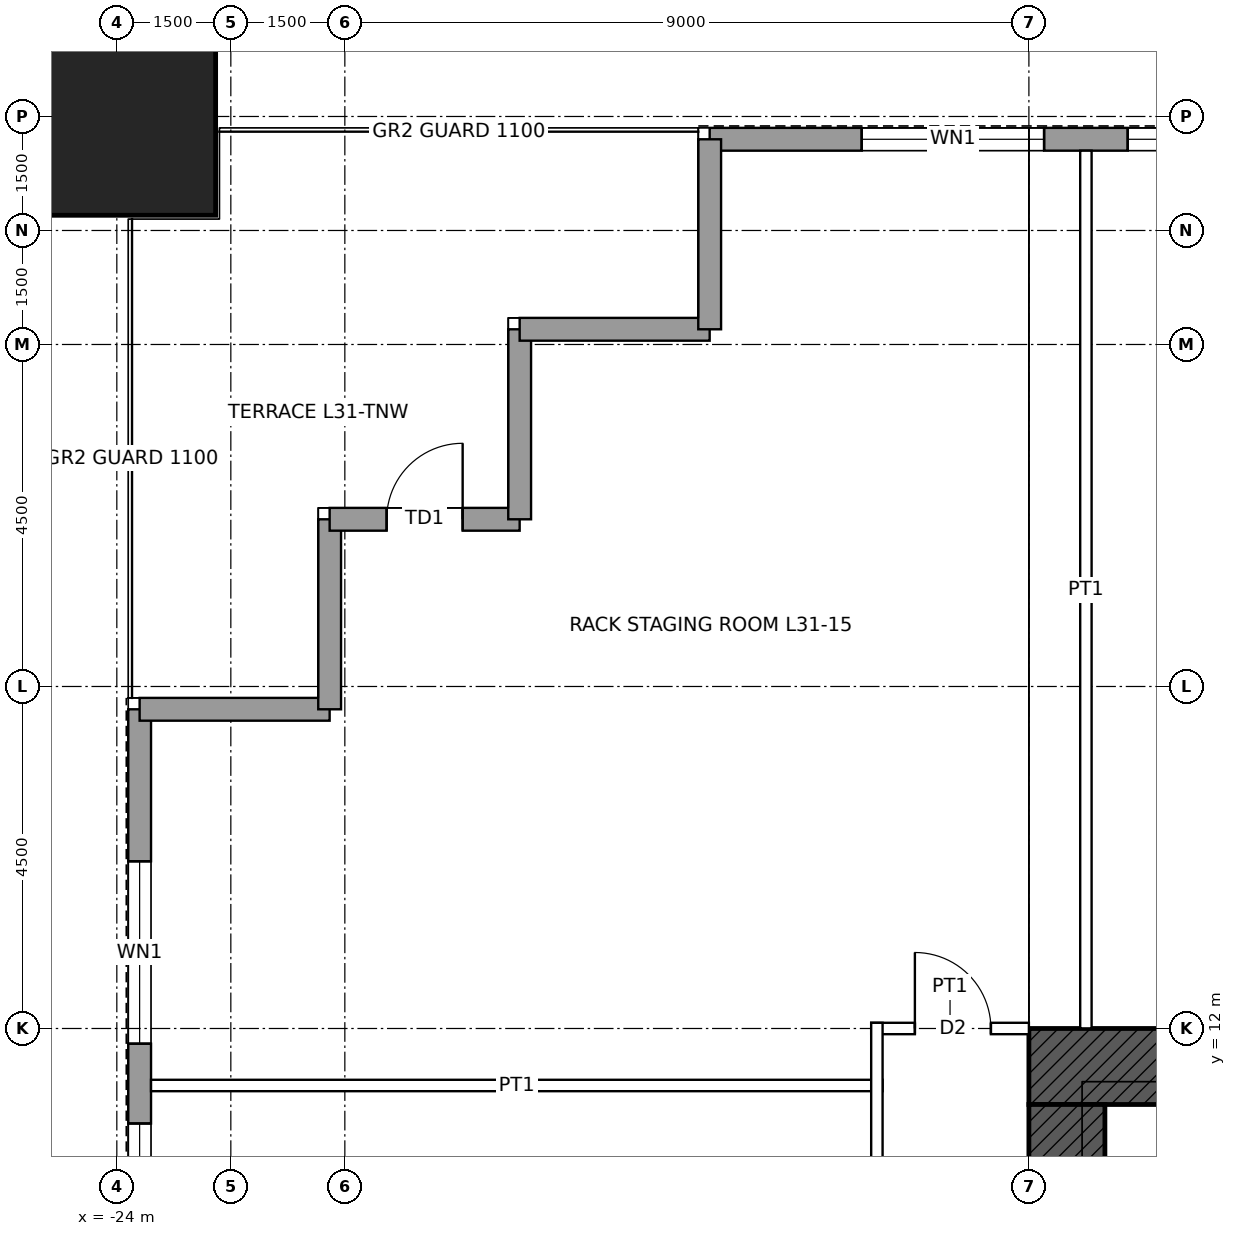
"""IFC4 building model, lengths in metres.
Left out: names, types, materials, properties, quantities, classifications, styles, units other than length and angle.
Written with IfcOpenShell. Run it as: python <this file> out.ifc"""

import sys

from ifc_helpers import new_model, si_unit, direction, frame, frame_2d, origin, origin_2d, place, context, subcontext, project, spatial, rectangle, hollow_rectangle, extrude, element, fill, save


model = new_model("IFC4")
c1 = context("Model", 3, precision=1e-05, world=origin(), true_north=direction((0.0, 1.0)))
c2 = subcontext(c1, "Body", "Model", "MODEL_VIEW")
j1 = project(units=[si_unit("LENGTHUNIT", "METRE"), si_unit("PLANEANGLEUNIT", "RADIAN")], contexts=[c1])
p1 = place(None, origin())
s1 = spatial("IfcSite", under=j1, at=p1, CompositionType="ELEMENT")
p2 = place(p1, origin())
s2 = spatial("IfcBuilding", under=s1, at=p2, CompositionType="ELEMENT")
p3 = place(p2, frame((0.0, 0.0, 153.9)))
s3 = spatial("IfcBuildingStorey", under=s2, at=p3, CompositionType="ELEMENT", Elevation=153.9)
p4 = place(p3, frame((-24.0, 24.0, 0.0), z_axis=(0.0, 0.0, 1.0), x_axis=(1.0, 0.0, 0.0)))
e1 = element("IfcColumn", 1, at=p4, inside=s3, PredefinedType="COLUMN", context=c2, shape_type="SweptSolid", body=[
    extrude(hollow_rectangle(XDim=2.6, YDim=2.6, WallThickness=0.13, at=origin_2d()), origin(), (0.0, 0.0, 1.0), 4.5),
])
p5 = place(p3, frame((-12.0, 11.5, 0.0), z_axis=(0.0, 0.0, 1.0), x_axis=(1.0, 0.0, 0.0)))
e2 = element("IfcWall", 2, at=p5, inside=s3, PredefinedType="SHEAR", context=c2, shape_type="SweptSolid", body=[
    extrude(rectangle(XDim=24.0, YDim=1.0, at=frame_2d((12.0, 0.0))), origin(), (0.0, 0.0, 1.0), 4.5),
])
p6 = place(p5, frame((6.25, 0.0, 0.0)))
e3 = element("IfcOpeningElement", 3, at=p6, cuts=e2, PredefinedType="OPENING", context=c2, shape_type="SweptSolid", body=[
    extrude(rectangle(XDim=1.0, YDim=2.4, at=frame_2d((0.5, 1.2))), frame((0.0, 0.51, 0.0), z_axis=(0.0, -1.0, 0.0), x_axis=(1.0, 0.0, 0.0)), (0.0, 0.0, 1.0), 1.02),
])
p7 = place(p5, frame((16.75, 0.0, 0.0)))
e4 = element("IfcOpeningElement", 4, at=p7, cuts=e2, PredefinedType="OPENING", context=c2, shape_type="SweptSolid", body=[
    extrude(rectangle(XDim=1.0, YDim=2.4, at=frame_2d((0.5, 1.2))), frame((0.0, 0.51, 0.0), z_axis=(0.0, -1.0, 0.0), x_axis=(1.0, 0.0, 0.0)), (0.0, 0.0, 1.0), 1.02),
])
p8 = place(p3, frame((-11.5, -11.0, 0.0), z_axis=(0.0, 0.0, 1.0), x_axis=(0.0, 1.0, 0.0)))
e5 = element("IfcWall", 5, at=p8, inside=s3, PredefinedType="SHEAR", context=c2, shape_type="SweptSolid", body=[
    extrude(rectangle(XDim=22.0, YDim=1.0, at=frame_2d((11.0, 0.0))), origin(), (0.0, 0.0, 1.0), 4.5),
])
p9 = place(p8, frame((10.5, 0.0, 0.0)))
e6 = element("IfcOpeningElement", 6, at=p9, cuts=e5, PredefinedType="OPENING", context=c2, shape_type="SweptSolid", body=[
    extrude(rectangle(XDim=1.0, YDim=2.4, at=frame_2d((0.5, 1.2))), frame((0.0, 0.51, 0.0), z_axis=(0.0, -1.0, 0.0), x_axis=(1.0, 0.0, 0.0)), (0.0, 0.0, 1.0), 1.02),
])
p10 = place(p3, frame((-16.2, 23.7, 0.0), z_axis=(0.0, 0.0, 1.0), x_axis=(1.0, 0.0, 0.0)))
e7 = element("IfcWall", 7, at=p10, inside=s3, PredefinedType="SOLIDWALL", context=c2, shape_type="SweptSolid", body=[
    extrude(rectangle(XDim=32.4, YDim=0.3, at=frame_2d((16.2, 0.0))), origin(), (0.0, 0.0, 1.0), 4.3),
])
p11 = place(p10, frame((2.0, 0.0, 1.0)))
e8 = element("IfcOpeningElement", 8, at=p11, cuts=e7, PredefinedType="OPENING", context=c2, shape_type="SweptSolid", body=[
    extrude(rectangle(XDim=2.4, YDim=1.2, at=frame_2d((1.2, 0.6))), frame((0.0, 0.16, 0.0), z_axis=(0.0, -1.0, 0.0), x_axis=(1.0, 0.0, 0.0)), (0.0, 0.0, 1.0), 0.32),
])
p12 = place(p10, frame((5.5, 0.0, 1.0)))
e9 = element("IfcOpeningElement", 9, at=p12, cuts=e7, PredefinedType="OPENING", context=c2, shape_type="SweptSolid", body=[
    extrude(rectangle(XDim=2.4, YDim=1.2, at=frame_2d((1.2, 0.6))), frame((0.0, 0.16, 0.0), z_axis=(0.0, -1.0, 0.0), x_axis=(1.0, 0.0, 0.0)), (0.0, 0.0, 1.0), 0.32),
])
p13 = place(p10, frame((9.1, 0.0, 1.0)))
e10 = element("IfcOpeningElement", 10, at=p13, cuts=e7, PredefinedType="OPENING", context=c2, shape_type="SweptSolid", body=[
    extrude(rectangle(XDim=2.4, YDim=1.2, at=frame_2d((1.2, 0.6))), frame((0.0, 0.16, 0.0), z_axis=(0.0, -1.0, 0.0), x_axis=(1.0, 0.0, 0.0)), (0.0, 0.0, 1.0), 0.32),
])
p14 = place(p10, frame((11.8, 0.0, 1.0)))
e11 = element("IfcOpeningElement", 11, at=p14, cuts=e7, PredefinedType="OPENING", context=c2, shape_type="SweptSolid", body=[
    extrude(rectangle(XDim=2.4, YDim=1.2, at=frame_2d((1.2, 0.6))), frame((0.0, 0.16, 0.0), z_axis=(0.0, -1.0, 0.0), x_axis=(1.0, 0.0, 0.0)), (0.0, 0.0, 1.0), 0.32),
])
p15 = place(p10, frame((18.2, 0.0, 1.0)))
e12 = element("IfcOpeningElement", 12, at=p15, cuts=e7, PredefinedType="OPENING", context=c2, shape_type="SweptSolid", body=[
    extrude(rectangle(XDim=2.4, YDim=1.2, at=frame_2d((1.2, 0.6))), frame((0.0, 0.16, 0.0), z_axis=(0.0, -1.0, 0.0), x_axis=(1.0, 0.0, 0.0)), (0.0, 0.0, 1.0), 0.32),
])
p16 = place(p10, frame((20.9, 0.0, 1.0)))
e13 = element("IfcOpeningElement", 13, at=p16, cuts=e7, PredefinedType="OPENING", context=c2, shape_type="SweptSolid", body=[
    extrude(rectangle(XDim=2.4, YDim=1.2, at=frame_2d((1.2, 0.6))), frame((0.0, 0.16, 0.0), z_axis=(0.0, -1.0, 0.0), x_axis=(1.0, 0.0, 0.0)), (0.0, 0.0, 1.0), 0.32),
])
p17 = place(p10, frame((24.5, 0.0, 1.0)))
e14 = element("IfcOpeningElement", 14, at=p17, cuts=e7, PredefinedType="OPENING", context=c2, shape_type="SweptSolid", body=[
    extrude(rectangle(XDim=2.4, YDim=1.2, at=frame_2d((1.2, 0.6))), frame((0.0, 0.16, 0.0), z_axis=(0.0, -1.0, 0.0), x_axis=(1.0, 0.0, 0.0)), (0.0, 0.0, 1.0), 0.32),
])
p18 = place(p10, frame((28.0, 0.0, 1.0)))
e15 = element("IfcOpeningElement", 15, at=p18, cuts=e7, PredefinedType="OPENING", context=c2, shape_type="SweptSolid", body=[
    extrude(rectangle(XDim=2.4, YDim=1.2, at=frame_2d((1.2, 0.6))), frame((0.0, 0.16, 0.0), z_axis=(0.0, -1.0, 0.0), x_axis=(1.0, 0.0, 0.0)), (0.0, 0.0, 1.0), 0.32),
])
p19 = place(p3, frame((-23.7, -16.2, 0.0), z_axis=(0.0, 0.0, 1.0), x_axis=(0.0, 1.0, 0.0)))
e16 = element("IfcWall", 16, at=p19, inside=s3, PredefinedType="SOLIDWALL", context=c2, shape_type="SweptSolid", body=[
    extrude(rectangle(XDim=32.4, YDim=0.3, at=frame_2d((16.2, 0.0))), origin(), (0.0, 0.0, 1.0), 4.3),
])
p20 = place(p19, frame((2.0, 0.0, 1.0)))
e17 = element("IfcOpeningElement", 17, at=p20, cuts=e16, PredefinedType="OPENING", context=c2, shape_type="SweptSolid", body=[
    extrude(rectangle(XDim=2.4, YDim=1.2, at=frame_2d((1.2, 0.6))), frame((0.0, 0.16, 0.0), z_axis=(0.0, -1.0, 0.0), x_axis=(1.0, 0.0, 0.0)), (0.0, 0.0, 1.0), 0.32),
])
p21 = place(p19, frame((5.45, 0.0, 1.0)))
e18 = element("IfcOpeningElement", 18, at=p21, cuts=e16, PredefinedType="OPENING", context=c2, shape_type="SweptSolid", body=[
    extrude(rectangle(XDim=2.4, YDim=1.2, at=frame_2d((1.2, 0.6))), frame((0.0, 0.16, 0.0), z_axis=(0.0, -1.0, 0.0), x_axis=(1.0, 0.0, 0.0)), (0.0, 0.0, 1.0), 0.32),
])
p22 = place(p19, frame((8.15, 0.0, 1.0)))
e19 = element("IfcOpeningElement", 19, at=p22, cuts=e16, PredefinedType="OPENING", context=c2, shape_type="SweptSolid", body=[
    extrude(rectangle(XDim=1.8, YDim=1.2, at=frame_2d((0.9, 0.6))), frame((0.0, 0.16, 0.0), z_axis=(0.0, -1.0, 0.0), x_axis=(1.0, 0.0, 0.0)), (0.0, 0.0, 1.0), 0.32),
])
p23 = place(p19, frame((10.25, 0.0, 1.0)))
e20 = element("IfcOpeningElement", 20, at=p23, cuts=e16, PredefinedType="OPENING", context=c2, shape_type="SweptSolid", body=[
    extrude(rectangle(XDim=1.8, YDim=1.2, at=frame_2d((0.9, 0.6))), frame((0.0, 0.16, 0.0), z_axis=(0.0, -1.0, 0.0), x_axis=(1.0, 0.0, 0.0)), (0.0, 0.0, 1.0), 0.32),
])
p24 = place(p19, frame((20.35, 0.0, 1.0)))
e21 = element("IfcOpeningElement", 21, at=p24, cuts=e16, PredefinedType="OPENING", context=c2, shape_type="SweptSolid", body=[
    extrude(rectangle(XDim=1.8, YDim=1.2, at=frame_2d((0.9, 0.6))), frame((0.0, 0.16, 0.0), z_axis=(0.0, -1.0, 0.0), x_axis=(1.0, 0.0, 0.0)), (0.0, 0.0, 1.0), 0.32),
])
p25 = place(p19, frame((22.45, 0.0, 1.0)))
e22 = element("IfcOpeningElement", 22, at=p25, cuts=e16, PredefinedType="OPENING", context=c2, shape_type="SweptSolid", body=[
    extrude(rectangle(XDim=1.8, YDim=1.2, at=frame_2d((0.9, 0.6))), frame((0.0, 0.16, 0.0), z_axis=(0.0, -1.0, 0.0), x_axis=(1.0, 0.0, 0.0)), (0.0, 0.0, 1.0), 0.32),
])
p26 = place(p19, frame((24.55, 0.0, 1.0)))
e23 = element("IfcOpeningElement", 23, at=p26, cuts=e16, PredefinedType="OPENING", context=c2, shape_type="SweptSolid", body=[
    extrude(rectangle(XDim=2.4, YDim=1.2, at=frame_2d((1.2, 0.6))), frame((0.0, 0.16, 0.0), z_axis=(0.0, -1.0, 0.0), x_axis=(1.0, 0.0, 0.0)), (0.0, 0.0, 1.0), 0.32),
])
p27 = place(p19, frame((28.0, 0.0, 1.0)))
e24 = element("IfcOpeningElement", 24, at=p27, cuts=e16, PredefinedType="OPENING", context=c2, shape_type="SweptSolid", body=[
    extrude(rectangle(XDim=2.4, YDim=1.2, at=frame_2d((1.2, 0.6))), frame((0.0, 0.16, 0.0), z_axis=(0.0, -1.0, 0.0), x_axis=(1.0, 0.0, 0.0)), (0.0, 0.0, 1.0), 0.32),
])
for number, where, z_axis, x_axis in (
    (25, (-23.7, 16.2, 0.0), (0.0, 0.0, 1.0), (1.0, 0.0, 0.0)),
    (26, (-21.2, 16.2, 0.0), (0.0, 0.0, 1.0), (0.0, 1.0, 0.0)),
):
    element("IfcWall", number, at=place(p3, frame(where, z_axis=z_axis, x_axis=x_axis)), inside=s3, PredefinedType="SOLIDWALL", context=c2, shape_type="SweptSolid", body=[
        extrude(rectangle(XDim=2.5, YDim=0.3, at=frame_2d((1.25, 0.0))), origin(), (0.0, 0.0, 1.0), 4.3),
    ])
p28 = place(p3, frame((-21.2, 18.7, 0.0), z_axis=(0.0, 0.0, 1.0), x_axis=(1.0, 0.0, 0.0)))
e27 = element("IfcWall", 27, at=p28, inside=s3, PredefinedType="SOLIDWALL", context=c2, shape_type="SweptSolid", body=[
    extrude(rectangle(XDim=2.5, YDim=0.3, at=frame_2d((1.25, 0.0))), origin(), (0.0, 0.0, 1.0), 4.3),
])
p29 = place(p28, frame((0.75, 0.0, 0.0)))
e28 = element("IfcOpeningElement", 28, at=p29, cuts=e27, PredefinedType="OPENING", context=c2, shape_type="SweptSolid", body=[
    extrude(rectangle(XDim=1.0, YDim=2.4, at=frame_2d((0.5, 1.2))), frame((0.0, 0.16, 0.0), z_axis=(0.0, -1.0, 0.0), x_axis=(1.0, 0.0, 0.0)), (0.0, 0.0, 1.0), 0.32),
])
for number, where, z_axis, x_axis in (
    (29, (-18.7, 18.7, 0.0), (0.0, 0.0, 1.0), (0.0, 1.0, 0.0)),
    (30, (-18.7, 21.2, 0.0), (0.0, 0.0, 1.0), (1.0, 0.0, 0.0)),
    (31, (-16.2, 21.2, 0.0), (0.0, 0.0, 1.0), (0.0, 1.0, 0.0)),
):
    element("IfcWall", number, at=place(p3, frame(where, z_axis=z_axis, x_axis=x_axis)), inside=s3, PredefinedType="SOLIDWALL", context=c2, shape_type="SweptSolid", body=[
        extrude(rectangle(XDim=2.5, YDim=0.3, at=frame_2d((1.25, 0.0))), origin(), (0.0, 0.0, 1.0), 4.3),
    ])
p30 = place(p3, frame((-23.55, 11.25, 0.0), z_axis=(0.0, 0.0, 1.0), x_axis=(1.0, 0.0, 0.0)))
e32 = element("IfcWall", 32, at=p30, inside=s3, PredefinedType="PARTITIONING", context=c2, shape_type="SweptSolid", body=[
    extrude(rectangle(XDim=9.625, YDim=0.15, at=frame_2d((4.812, 0.0))), origin(), (0.0, 0.0, 1.0), 3.431),
])
p31 = place(p3, frame((-14.075, 12.0, 0.0), z_axis=(0.0, 0.0, 1.0), x_axis=(1.0, 0.0, 0.0)))
e33 = element("IfcWall", 33, at=p31, inside=s3, PredefinedType="PARTITIONING", context=c2, shape_type="SweptSolid", body=[
    extrude(rectangle(XDim=2.075, YDim=0.15, at=frame_2d((1.038, 0.0))), origin(), (0.0, 0.0, 1.0), 4.3),
])
p32 = place(p31, frame((0.575, 0.0, 0.0)))
e34 = element("IfcOpeningElement", 34, at=p32, cuts=e33, PredefinedType="OPENING", context=c2, shape_type="SweptSolid", body=[
    extrude(rectangle(XDim=1.0, YDim=2.1, at=frame_2d((0.5, 1.05))), frame((0.0, 0.085, 0.0), z_axis=(0.0, -1.0, 0.0), x_axis=(1.0, 0.0, 0.0)), (0.0, 0.0, 1.0), 0.17),
])
p33 = place(p3, frame((-14.0, -14.075, 0.0), z_axis=(0.0, 0.0, 1.0), x_axis=(0.0, 1.0, 0.0)))
e35 = element("IfcWall", 35, at=p33, inside=s3, PredefinedType="PARTITIONING", context=c2, shape_type="SweptSolid", body=[
    extrude(rectangle(XDim=26.15, YDim=0.15, at=frame_2d((13.075, 0.0))), origin(), (0.0, 0.0, 1.0), 4.3),
])
p34 = place(p33, frame((5.675, 0.0, 0.0)))
e36 = element("IfcOpeningElement", 36, at=p34, cuts=e35, PredefinedType="OPENING", context=c2, shape_type="SweptSolid", body=[
    extrude(rectangle(XDim=1.8, YDim=2.4, at=frame_2d((0.9, 1.2))), frame((0.0, 0.085, 0.0), z_axis=(0.0, -1.0, 0.0), x_axis=(1.0, 0.0, 0.0)), (0.0, 0.0, 1.0), 0.17),
])
p35 = place(p33, frame((13.175, 0.0, 0.0)))
e37 = element("IfcOpeningElement", 37, at=p35, cuts=e35, PredefinedType="OPENING", context=c2, shape_type="SweptSolid", body=[
    extrude(rectangle(XDim=1.8, YDim=2.4, at=frame_2d((0.9, 1.2))), frame((0.0, 0.085, 0.0), z_axis=(0.0, -1.0, 0.0), x_axis=(1.0, 0.0, 0.0)), (0.0, 0.0, 1.0), 0.17),
])
p36 = place(p33, frame((20.675, 0.0, 0.0)))
e38 = element("IfcOpeningElement", 38, at=p36, cuts=e35, PredefinedType="OPENING", context=c2, shape_type="SweptSolid", body=[
    extrude(rectangle(XDim=1.8, YDim=2.4, at=frame_2d((0.9, 1.2))), frame((0.0, 0.085, 0.0), z_axis=(0.0, -1.0, 0.0), x_axis=(1.0, 0.0, 0.0)), (0.0, 0.0, 1.0), 0.17),
])
p37 = place(p3, frame((-11.25, 12.0, 0.0), z_axis=(0.0, 0.0, 1.0), x_axis=(0.0, 1.0, 0.0)))
e39 = element("IfcWall", 39, at=p37, inside=s3, PredefinedType="PARTITIONING", context=c2, shape_type="SweptSolid", body=[
    extrude(rectangle(XDim=11.55, YDim=0.15, at=frame_2d((5.775, 0.0))), origin(), (0.0, 0.0, 1.0), 3.431),
])
p38 = place(p11, origin())
e40 = element("IfcWindow", 40, at=p38, inside=s3, PartitioningType="SINGLE_PANEL", PredefinedType="WINDOW", context=c2, shape_type="SweptSolid", body=[
    extrude(rectangle(XDim=2.4, YDim=1.2, at=frame_2d((1.2, 0.6))), frame((0.0, 0.03, 0.0), z_axis=(0.0, -1.0, 0.0), x_axis=(1.0, 0.0, 0.0)), (0.0, 0.0, 1.0), 0.06),
])
fill(e8, e40)
p39 = place(p12, origin())
e41 = element("IfcWindow", 41, at=p39, inside=s3, PartitioningType="SINGLE_PANEL", PredefinedType="WINDOW", context=c2, shape_type="SweptSolid", body=[
    extrude(rectangle(XDim=2.4, YDim=1.2, at=frame_2d((1.2, 0.6))), frame((0.0, 0.03, 0.0), z_axis=(0.0, -1.0, 0.0), x_axis=(1.0, 0.0, 0.0)), (0.0, 0.0, 1.0), 0.06),
])
fill(e9, e41)
p40 = place(p26, origin())
e42 = element("IfcWindow", 42, at=p40, inside=s3, PartitioningType="SINGLE_PANEL", PredefinedType="WINDOW", context=c2, shape_type="SweptSolid", body=[
    extrude(rectangle(XDim=2.4, YDim=1.2, at=frame_2d((1.2, 0.6))), frame((0.0, 0.03, 0.0), z_axis=(0.0, -1.0, 0.0), x_axis=(1.0, 0.0, 0.0)), (0.0, 0.0, 1.0), 0.06),
])
fill(e23, e42)
p41 = place(p27, origin())
e43 = element("IfcWindow", 43, at=p41, inside=s3, PartitioningType="SINGLE_PANEL", PredefinedType="WINDOW", context=c2, shape_type="SweptSolid", body=[
    extrude(rectangle(XDim=2.4, YDim=1.2, at=frame_2d((1.2, 0.6))), frame((0.0, 0.03, 0.0), z_axis=(0.0, -1.0, 0.0), x_axis=(1.0, 0.0, 0.0)), (0.0, 0.0, 1.0), 0.06),
])
fill(e24, e43)
p42 = place(p29, origin())
e44 = element("IfcDoor", 44, at=p42, inside=s3, OperationType="SINGLE_SWING_RIGHT", PredefinedType="DOOR", context=c2, shape_type="SweptSolid", body=[
    extrude(rectangle(XDim=1.0, YDim=2.4, at=frame_2d((0.5, 1.2))), frame((0.0, 0.025, 0.0), z_axis=(0.0, -1.0, 0.0), x_axis=(1.0, 0.0, 0.0)), (0.0, 0.0, 1.0), 0.05),
])
fill(e28, e44)
p43 = place(p32, origin())
e45 = element("IfcDoor", 45, at=p43, inside=s3, OperationType="SINGLE_SWING_LEFT", PredefinedType="DOOR", context=c2, shape_type="SweptSolid", body=[
    extrude(rectangle(XDim=1.0, YDim=2.1, at=frame_2d((0.5, 1.05))), frame((0.0, 0.025, 0.0), z_axis=(0.0, -1.0, 0.0), x_axis=(1.0, 0.0, 0.0)), (0.0, 0.0, 1.0), 0.05),
])
fill(e34, e45)
save(model, sys.argv[1])
